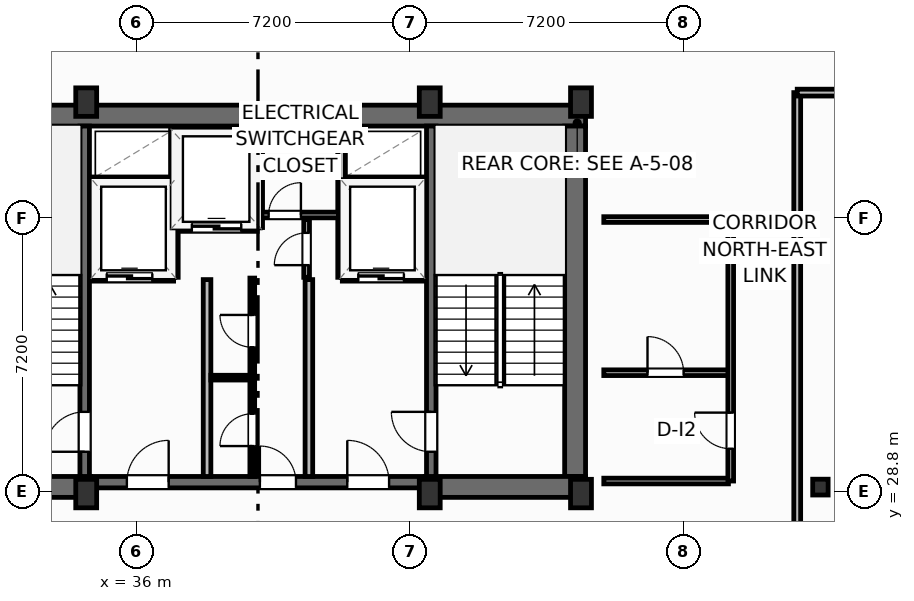
"""IFC4 building model, lengths in metres.
Left out: names, types, materials, properties, quantities, classifications, styles, units other than length and angle.
Written with IfcOpenShell. Run it as: python <this file> out.ifc"""

import sys

from ifc_helpers import new_model, si_unit, direction, frame, frame_2d, origin, origin_2d, place, context, subcontext, project, spatial, rectangle, i_section, extrude, element, fill, save


model = new_model("IFC4")
c1 = context("Model", 3, precision=1e-05, world=origin(), true_north=direction((0.0, 1.0)))
c2 = subcontext(c1, "Body", "Model", "MODEL_VIEW")
j1 = project(units=[si_unit("LENGTHUNIT", "METRE"), si_unit("PLANEANGLEUNIT", "RADIAN")], contexts=[c1])
p1 = place(None, origin())
s1 = spatial("IfcSite", under=j1, at=p1, CompositionType="ELEMENT")
p2 = place(p1, origin())
s2 = spatial("IfcBuilding", under=s1, at=p2, CompositionType="ELEMENT")
p3 = place(p2, frame((0.0, 0.0, 258.2)))
s3 = spatial("IfcBuildingStorey", under=s2, at=p3, CompositionType="ELEMENT", Elevation=258.2)
for number, where, z_axis, x_axis in (
    (1, (34.68, 28.75, 0.0), (0.0, 0.0, 1.0), (1.0, 0.0, 0.0)),
    (2, (43.72, 28.75, 0.0), (0.0, 0.0, 1.0), (1.0, 0.0, 0.0)),
    (3, (47.7, 28.75, 0.0), (0.0, 0.0, 1.0), (1.0, 0.0, 0.0)),
    (4, (34.68, 39.05, 0.0), (0.0, 0.0, 1.0), (1.0, 0.0, 0.0)),
    (5, (43.72, 39.05, 0.0), (0.0, 0.0, 1.0), (1.0, 0.0, 0.0)),
    (6, (47.7, 39.05, 0.0), (0.0, 0.0, 1.0), (1.0, 0.0, 0.0)),
):
    element("IfcColumn", number, at=place(p3, frame(where, z_axis=z_axis, x_axis=x_axis)), inside=s3, PredefinedType="COLUMN", context=c2, shape_type="SweptSolid", body=[
        extrude(rectangle(XDim=0.55, YDim=0.75, at=origin_2d()), origin(), (0.0, 0.0, 1.0), 3.7),
    ])
p4 = place(p3, frame((54.0, 28.92, 0.0), z_axis=(0.0, 0.0, 1.0), x_axis=(1.0, 0.0, 0.0)))
e7 = element("IfcColumn", 7, at=p4, inside=s3, PredefinedType="COLUMN", context=c2, shape_type="SweptSolid", body=[
    extrude(i_section(OverallWidth=0.406, OverallDepth=0.416, WebThickness=0.03, FlangeThickness=0.048, FilletRadius=0.025, at=origin_2d()), origin(), (0.0, 0.0, 1.0), 3.7),
])
p5 = place(p3, frame((30.58, 38.695, 0.0), z_axis=(0.0, 0.0, 1.0), x_axis=(1.0, 0.0, 0.0)))
e8 = element("IfcWall", 8, at=p5, inside=s3, PredefinedType="SHEAR", context=c2, shape_type="SweptSolid", body=[
    extrude(rectangle(XDim=17.24, YDim=0.55, at=frame_2d((8.62, 0.0))), origin(), (0.0, 0.0, 1.0), 3.45),
])
p6 = place(p3, frame((47.545, 29.2, 0.0), z_axis=(0.0, 0.0, 1.0), x_axis=(0.0, 1.0, 0.0)))
e9 = element("IfcWall", 9, at=p6, inside=s3, PredefinedType="SHEAR", context=c2, shape_type="SweptSolid", body=[
    extrude(rectangle(XDim=9.22, YDim=0.55, at=frame_2d((4.61, 0.0))), origin(), (0.0, 0.0, 1.0), 3.45),
])
for number, where, z_axis, x_axis in (
    (10, (30.58, 28.925, 0.0), (0.0, 0.0, 1.0), (1.0, 0.0, 0.0)),
    (11, (43.6, 28.925, 0.0), (0.0, 0.0, 1.0), (1.0, 0.0, 0.0)),
):
    element("IfcWall", number, at=place(p3, frame(where, z_axis=z_axis, x_axis=x_axis)), inside=s3, PredefinedType="SHEAR", context=c2, shape_type="SweptSolid", body=[
        extrude(rectangle(XDim=4.22, YDim=0.55, at=frame_2d((2.11, 0.0))), origin(), (0.0, 0.0, 1.0), 3.45),
    ])
p7 = place(p3, frame((34.8, 29.05, 0.0), z_axis=(0.0, 0.0, 1.0), x_axis=(1.0, 0.0, 0.0)))
e12 = element("IfcWall", 12, at=p7, inside=s3, PredefinedType="SHEAR", context=c2, shape_type="SweptSolid", body=[
    extrude(rectangle(XDim=8.8, YDim=0.3, at=frame_2d((4.4, 0.0))), origin(), (0.0, 0.0, 1.0), 3.45),
])
p8 = place(p7, frame((0.95, 0.0, 0.0)))
e13 = element("IfcOpeningElement", 13, at=p8, cuts=e12, PredefinedType="OPENING", context=c2, shape_type="SweptSolid", body=[
    extrude(rectangle(XDim=1.1, YDim=2.15, at=frame_2d((0.55, 1.075))), frame((0.0, 0.16, 0.0), z_axis=(0.0, -1.0, 0.0), x_axis=(1.0, 0.0, 0.0)), (0.0, 0.0, 1.0), 0.32),
])
p9 = place(p7, frame((6.75, 0.0, 0.0)))
e14 = element("IfcOpeningElement", 14, at=p9, cuts=e12, PredefinedType="OPENING", context=c2, shape_type="SweptSolid", body=[
    extrude(rectangle(XDim=1.1, YDim=2.15, at=frame_2d((0.55, 1.075))), frame((0.0, 0.16, 0.0), z_axis=(0.0, -1.0, 0.0), x_axis=(1.0, 0.0, 0.0)), (0.0, 0.0, 1.0), 0.32),
])
p10 = place(p7, frame((4.45, 0.0, 0.0)))
e15 = element("IfcOpeningElement", 15, at=p10, cuts=e12, PredefinedType="OPENING", context=c2, shape_type="SweptSolid", body=[
    extrude(rectangle(XDim=0.95, YDim=2.15, at=frame_2d((0.475, 1.075))), frame((0.0, 0.16, 0.0), z_axis=(0.0, -1.0, 0.0), x_axis=(1.0, 0.0, 0.0)), (0.0, 0.0, 1.0), 0.32),
])
p11 = place(p3, frame((34.64, 29.2, 0.0), z_axis=(0.0, 0.0, 1.0), x_axis=(0.0, 1.0, 0.0)))
e16 = element("IfcWall", 16, at=p11, inside=s3, PredefinedType="SHEAR", context=c2, shape_type="SweptSolid", body=[
    extrude(rectangle(XDim=9.22, YDim=0.25, at=frame_2d((4.61, 0.0))), origin(), (0.0, 0.0, 1.0), 3.45),
])
p12 = place(p11, frame((0.65, 0.0, 0.0)))
e17 = element("IfcOpeningElement", 17, at=p12, cuts=e16, PredefinedType="OPENING", context=c2, shape_type="SweptSolid", body=[
    extrude(rectangle(XDim=1.05, YDim=2.15, at=frame_2d((0.525, 1.075))), frame((0.0, 0.135, 0.0), z_axis=(0.0, -1.0, 0.0), x_axis=(1.0, 0.0, 0.0)), (0.0, 0.0, 1.0), 0.27),
])
p13 = place(p3, frame((43.76, 29.2, 0.0), z_axis=(0.0, 0.0, 1.0), x_axis=(0.0, 1.0, 0.0)))
e18 = element("IfcWall", 18, at=p13, inside=s3, PredefinedType="SHEAR", context=c2, shape_type="SweptSolid", body=[
    extrude(rectangle(XDim=9.22, YDim=0.25, at=frame_2d((4.61, 0.0))), origin(), (0.0, 0.0, 1.0), 3.45),
])
p14 = place(p13, frame((0.65, 0.0, 0.0)))
e19 = element("IfcOpeningElement", 19, at=p14, cuts=e18, PredefinedType="OPENING", context=c2, shape_type="SweptSolid", body=[
    extrude(rectangle(XDim=1.05, YDim=2.15, at=frame_2d((0.525, 1.075))), frame((0.0, 0.135, 0.0), z_axis=(0.0, -1.0, 0.0), x_axis=(1.0, 0.0, 0.0)), (0.0, 0.0, 1.0), 0.27),
])
p15 = place(p3, frame((53.39, 19.24, 0.0), z_axis=(0.0, 0.0, 1.0), x_axis=(0.0, 1.0, 0.0)))
e20 = element("IfcWall", 20, at=p15, inside=s3, PredefinedType="PARTITIONING", context=c2, shape_type="SweptSolid", body=[
    extrude(rectangle(XDim=20.06, YDim=0.18, at=frame_2d((10.03, 0.0))), origin(), (0.0, 0.0, 1.0), 3.45),
])
p16 = place(p15, frame((7.7, 0.0, 0.0)))
e21 = element("IfcOpeningElement", 21, at=p16, cuts=e20, PredefinedType="OPENING", context=c2, shape_type="SweptSolid", body=[
    extrude(rectangle(XDim=0.95, YDim=2.05, at=frame_2d((0.475, 1.025))), frame((0.0, 0.1, 0.0), z_axis=(0.0, -1.0, 0.0), x_axis=(1.0, 0.0, 0.0)), (0.0, 0.0, 1.0), 0.2),
])
p17 = place(p3, frame((53.39, 39.3, 0.0), z_axis=(0.0, 0.0, 1.0), x_axis=(1.0, 0.0, 0.0)))
e22 = element("IfcWall", 22, at=p17, inside=s3, PredefinedType="PARTITIONING", context=c2, shape_type="SweptSolid", body=[
    extrude(rectangle(XDim=16.149, YDim=0.18, at=frame_2d((8.075, 0.0))), origin(), (0.0, 0.0, 1.0), 2.739),
])
for number, where, z_axis, x_axis in (
    (23, (37.86, 29.2, 0.0), (0.0, 0.0, 1.0), (0.0, 1.0, 0.0)),
    (24, (40.54, 29.2, 0.0), (0.0, 0.0, 1.0), (0.0, 1.0, 0.0)),
):
    element("IfcWall", number, at=place(p3, frame(where, z_axis=z_axis, x_axis=x_axis)), inside=s3, PredefinedType="PARTITIONING", context=c2, shape_type="SweptSolid", body=[
        extrude(rectangle(XDim=5.18, YDim=0.2, at=frame_2d((2.59, 0.0))), origin(), (0.0, 0.0, 1.0), 3.45),
    ])
p18 = place(p3, frame((34.8, 34.44, 0.0), z_axis=(0.0, 0.0, 1.0), x_axis=(1.0, 0.0, 0.0)))
e25 = element("IfcWall", 25, at=p18, inside=s3, PredefinedType="PARTITIONING", context=c2, shape_type="SweptSolid", body=[
    extrude(rectangle(XDim=2.18, YDim=0.2, at=frame_2d((1.09, 0.0))), origin(), (0.0, 0.0, 1.0), 3.45),
])
p19 = place(p18, frame((0.42, 0.0, 0.0)))
e26 = element("IfcOpeningElement", 26, at=p19, cuts=e25, PredefinedType="OPENING", context=c2, shape_type="SweptSolid", body=[
    extrude(rectangle(XDim=1.2, YDim=2.2, at=frame_2d((0.6, 1.1))), frame((0.0, 0.11, 0.0), z_axis=(0.0, -1.0, 0.0), x_axis=(1.0, 0.0, 0.0)), (0.0, 0.0, 1.0), 0.22),
])
p20 = place(p3, frame((34.8, 36.98, 0.0), z_axis=(0.0, 0.0, 1.0), x_axis=(1.0, 0.0, 0.0)))
e27 = element("IfcWall", 27, at=p20, inside=s3, PredefinedType="PARTITIONING", context=c2, shape_type="SweptSolid", body=[
    extrude(rectangle(XDim=2.18, YDim=0.2, at=frame_2d((1.09, 0.0))), origin(), (0.0, 0.0, 1.0), 3.45),
])
p21 = place(p3, frame((37.0, 34.44, 0.0), z_axis=(0.0, 0.0, 1.0), x_axis=(0.0, 1.0, 0.0)))
e28 = element("IfcWall", 28, at=p21, inside=s3, PredefinedType="PARTITIONING", context=c2, shape_type="SweptSolid", body=[
    extrude(rectangle(XDim=3.9, YDim=0.2, at=frame_2d((1.95, 0.0))), origin(), (0.0, 0.0, 1.0), 3.45),
])
p22 = place(p3, frame((41.42, 34.44, 0.0), z_axis=(0.0, 0.0, 1.0), x_axis=(1.0, 0.0, 0.0)))
e29 = element("IfcWall", 29, at=p22, inside=s3, PredefinedType="PARTITIONING", context=c2, shape_type="SweptSolid", body=[
    extrude(rectangle(XDim=2.18, YDim=0.2, at=frame_2d((1.09, 0.0))), origin(), (0.0, 0.0, 1.0), 3.45),
])
p23 = place(p22, frame((0.42, 0.0, 0.0)))
e30 = element("IfcOpeningElement", 30, at=p23, cuts=e29, PredefinedType="OPENING", context=c2, shape_type="SweptSolid", body=[
    extrude(rectangle(XDim=1.2, YDim=2.2, at=frame_2d((0.6, 1.1))), frame((0.0, 0.11, 0.0), z_axis=(0.0, -1.0, 0.0), x_axis=(1.0, 0.0, 0.0)), (0.0, 0.0, 1.0), 0.22),
])
p24 = place(p3, frame((41.42, 36.98, 0.0), z_axis=(0.0, 0.0, 1.0), x_axis=(1.0, 0.0, 0.0)))
e31 = element("IfcWall", 31, at=p24, inside=s3, PredefinedType="PARTITIONING", context=c2, shape_type="SweptSolid", body=[
    extrude(rectangle(XDim=2.18, YDim=0.2, at=frame_2d((1.09, 0.0))), origin(), (0.0, 0.0, 1.0), 3.45),
])
p25 = place(p3, frame((41.4, 34.44, 0.0), z_axis=(0.0, 0.0, 1.0), x_axis=(0.0, 1.0, 0.0)))
e32 = element("IfcWall", 32, at=p25, inside=s3, PredefinedType="PARTITIONING", context=c2, shape_type="SweptSolid", body=[
    extrude(rectangle(XDim=3.9, YDim=0.2, at=frame_2d((1.95, 0.0))), origin(), (0.0, 0.0, 1.0), 3.45),
])
p26 = place(p3, frame((37.06, 35.75, 0.0), z_axis=(0.0, 0.0, 1.0), x_axis=(1.0, 0.0, 0.0)))
e33 = element("IfcWall", 33, at=p26, inside=s3, PredefinedType="PARTITIONING", context=c2, shape_type="SweptSolid", body=[
    extrude(rectangle(XDim=2.12, YDim=0.2, at=frame_2d((1.06, 0.0))), origin(), (0.0, 0.0, 1.0), 3.45),
])
p27 = place(p26, frame((0.4, 0.0, 0.0)))
e34 = element("IfcOpeningElement", 34, at=p27, cuts=e33, PredefinedType="OPENING", context=c2, shape_type="SweptSolid", body=[
    extrude(rectangle(XDim=1.3, YDim=2.2, at=frame_2d((0.65, 1.1))), frame((0.0, 0.11, 0.0), z_axis=(0.0, -1.0, 0.0), x_axis=(1.0, 0.0, 0.0)), (0.0, 0.0, 1.0), 0.22),
])
p28 = place(p3, frame((39.22, 35.75, 0.0), z_axis=(0.0, 0.0, 1.0), x_axis=(0.0, 1.0, 0.0)))
e35 = element("IfcWall", 35, at=p28, inside=s3, PredefinedType="PARTITIONING", context=c2, shape_type="SweptSolid", body=[
    extrude(rectangle(XDim=2.59, YDim=0.2, at=frame_2d((1.295, 0.0))), origin(), (0.0, 0.0, 1.0), 3.45),
])
p29 = place(p3, frame((39.3, 36.08, 0.0), z_axis=(0.0, 0.0, 1.0), x_axis=(1.0, 0.0, 0.0)))
e36 = element("IfcWall", 36, at=p29, inside=s3, PredefinedType="PARTITIONING", context=c2, shape_type="SweptSolid", body=[
    extrude(rectangle(XDim=2.02, YDim=0.15, at=frame_2d((1.01, 0.0))), origin(), (0.0, 0.0, 1.0), 3.45),
])
p30 = place(p29, frame((0.18, 0.0, 0.0)))
e37 = element("IfcOpeningElement", 37, at=p30, cuts=e36, PredefinedType="OPENING", context=c2, shape_type="SweptSolid", body=[
    extrude(rectangle(XDim=0.85, YDim=2.05, at=frame_2d((0.425, 1.025))), frame((0.0, 0.085, 0.0), z_axis=(0.0, -1.0, 0.0), x_axis=(1.0, 0.0, 0.0)), (0.0, 0.0, 1.0), 0.17),
])
p31 = place(p3, frame((40.48, 34.44, 0.0), z_axis=(0.0, 0.0, 1.0), x_axis=(0.0, 1.0, 0.0)))
e38 = element("IfcWall", 38, at=p31, inside=s3, PredefinedType="PARTITIONING", context=c2, shape_type="SweptSolid", body=[
    extrude(rectangle(XDim=1.52, YDim=0.15, at=frame_2d((0.76, 0.0))), origin(), (0.0, 0.0, 1.0), 3.45),
])
p32 = place(p31, frame((0.32, 0.0, 0.0)))
e39 = element("IfcOpeningElement", 39, at=p32, cuts=e38, PredefinedType="OPENING", context=c2, shape_type="SweptSolid", body=[
    extrude(rectangle(XDim=0.85, YDim=2.05, at=frame_2d((0.425, 1.025))), frame((0.0, 0.085, 0.0), z_axis=(0.0, -1.0, 0.0), x_axis=(1.0, 0.0, 0.0)), (0.0, 0.0, 1.0), 0.17),
])
p33 = place(p3, frame((37.96, 31.8, 0.0), z_axis=(0.0, 0.0, 1.0), x_axis=(1.0, 0.0, 0.0)))
e40 = element("IfcWall", 40, at=p33, inside=s3, PredefinedType="PARTITIONING", context=c2, shape_type="SweptSolid", body=[
    extrude(rectangle(XDim=1.09, YDim=0.125, at=frame_2d((0.545, 0.0))), origin(), (0.0, 0.0, 1.0), 3.45),
])
p34 = place(p3, frame((39.05, 29.2, 0.0), z_axis=(0.0, 0.0, 1.0), x_axis=(0.0, 1.0, 0.0)))
e41 = element("IfcWall", 41, at=p34, inside=s3, PredefinedType="PARTITIONING", context=c2, shape_type="SweptSolid", body=[
    extrude(rectangle(XDim=5.22, YDim=0.125, at=frame_2d((2.61, 0.0))), origin(), (0.0, 0.0, 1.0), 3.45),
])
p35 = place(p34, frame((0.8, 0.0, 0.0)))
e42 = element("IfcOpeningElement", 42, at=p35, cuts=e41, PredefinedType="OPENING", context=c2, shape_type="SweptSolid", body=[
    extrude(rectangle(XDim=0.85, YDim=2.05, at=frame_2d((0.425, 1.025))), frame((0.0, 0.073, 0.0), z_axis=(0.0, -1.0, 0.0), x_axis=(1.0, 0.0, 0.0)), (0.0, 0.0, 1.0), 0.145),
])
p36 = place(p34, frame((3.4, 0.0, 0.0)))
e43 = element("IfcOpeningElement", 43, at=p36, cuts=e41, PredefinedType="OPENING", context=c2, shape_type="SweptSolid", body=[
    extrude(rectangle(XDim=0.85, YDim=2.05, at=frame_2d((0.425, 1.025))), frame((0.0, 0.073, 0.0), z_axis=(0.0, -1.0, 0.0), x_axis=(1.0, 0.0, 0.0)), (0.0, 0.0, 1.0), 0.145),
])
p37 = place(p3, frame((48.3, 31.93, 0.0), z_axis=(0.0, 0.0, 1.0), x_axis=(1.0, 0.0, 0.0)))
e44 = element("IfcWall", 44, at=p37, inside=s3, PredefinedType="PARTITIONING", context=c2, shape_type="SweptSolid", body=[
    extrude(rectangle(XDim=3.28, YDim=0.15, at=frame_2d((1.64, 0.0))), origin(), (0.0, 0.0, 1.0), 3.45),
])
p38 = place(p37, frame((1.15, 0.0, 0.0)))
e45 = element("IfcOpeningElement", 45, at=p38, cuts=e44, PredefinedType="OPENING", context=c2, shape_type="SweptSolid", body=[
    extrude(rectangle(XDim=0.95, YDim=2.05, at=frame_2d((0.475, 1.025))), frame((0.0, 0.085, 0.0), z_axis=(0.0, -1.0, 0.0), x_axis=(1.0, 0.0, 0.0)), (0.0, 0.0, 1.0), 0.17),
])
p39 = place(p3, frame((48.3, 29.08, 0.0), z_axis=(0.0, 0.0, 1.0), x_axis=(1.0, 0.0, 0.0)))
e46 = element("IfcWall", 46, at=p39, inside=s3, PredefinedType="PARTITIONING", context=c2, shape_type="SweptSolid", body=[
    extrude(rectangle(XDim=3.28, YDim=0.15, at=frame_2d((1.64, 0.0))), origin(), (0.0, 0.0, 1.0), 2.662),
])
p40 = place(p3, frame((48.3, 35.96, 0.0), z_axis=(0.0, 0.0, 1.0), x_axis=(1.0, 0.0, 0.0)))
e47 = element("IfcWall", 47, at=p40, inside=s3, PredefinedType="PARTITIONING", context=c2, shape_type="SweptSolid", body=[
    extrude(rectangle(XDim=3.28, YDim=0.15, at=frame_2d((1.64, 0.0))), origin(), (0.0, 0.0, 1.0), 3.45),
])
p41 = place(p3, frame((51.64, 29.08, 0.0), z_axis=(0.0, 0.0, 1.0), x_axis=(0.0, 1.0, 0.0)))
e48 = element("IfcWall", 48, at=p41, inside=s3, PredefinedType="PARTITIONING", context=c2, shape_type="SweptSolid", body=[
    extrude(rectangle(XDim=6.88, YDim=0.15, at=frame_2d((3.44, 0.0))), origin(), (0.0, 0.0, 1.0), 3.45),
])
p42 = place(p41, frame((0.85, 0.0, 0.0)))
e49 = element("IfcOpeningElement", 49, at=p42, cuts=e48, PredefinedType="OPENING", context=c2, shape_type="SweptSolid", body=[
    extrude(rectangle(XDim=0.95, YDim=2.05, at=frame_2d((0.475, 1.025))), frame((0.0, 0.085, 0.0), z_axis=(0.0, -1.0, 0.0), x_axis=(1.0, 0.0, 0.0)), (0.0, 0.0, 1.0), 0.17),
])
p43 = place(p12, origin())
e50 = element("IfcDoor", 50, at=p43, inside=s3, OperationType="SINGLE_SWING_LEFT", PredefinedType="DOOR", context=c2, shape_type="SweptSolid", body=[
    extrude(rectangle(XDim=1.05, YDim=2.15, at=frame_2d((0.525, 1.075))), frame((0.0, 0.025, 0.0), z_axis=(0.0, -1.0, 0.0), x_axis=(1.0, 0.0, 0.0)), (0.0, 0.0, 1.0), 0.05),
])
fill(e17, e50)
p44 = place(p14, origin())
e51 = element("IfcDoor", 51, at=p44, inside=s3, OperationType="SINGLE_SWING_RIGHT", PredefinedType="DOOR", context=c2, shape_type="SweptSolid", body=[
    extrude(rectangle(XDim=1.05, YDim=2.15, at=frame_2d((0.525, 1.075))), frame((0.0, 0.025, 0.0), z_axis=(0.0, -1.0, 0.0), x_axis=(1.0, 0.0, 0.0)), (0.0, 0.0, 1.0), 0.05),
])
fill(e19, e51)
p45 = place(p8, origin())
e52 = element("IfcDoor", 52, at=p45, inside=s3, OperationType="SINGLE_SWING_RIGHT", PredefinedType="DOOR", context=c2, shape_type="SweptSolid", body=[
    extrude(rectangle(XDim=1.1, YDim=2.15, at=frame_2d((0.55, 1.075))), frame((0.0, 0.025, 0.0), z_axis=(0.0, -1.0, 0.0), x_axis=(1.0, 0.0, 0.0)), (0.0, 0.0, 1.0), 0.05),
])
fill(e13, e52)
p46 = place(p9, origin())
e53 = element("IfcDoor", 53, at=p46, inside=s3, OperationType="SINGLE_SWING_LEFT", PredefinedType="DOOR", context=c2, shape_type="SweptSolid", body=[
    extrude(rectangle(XDim=1.1, YDim=2.15, at=frame_2d((0.55, 1.075))), frame((0.0, 0.025, 0.0), z_axis=(0.0, -1.0, 0.0), x_axis=(1.0, 0.0, 0.0)), (0.0, 0.0, 1.0), 0.05),
])
fill(e14, e53)
p47 = place(p19, origin())
e54 = element("IfcDoor", 54, at=p47, inside=s3, OperationType="SLIDING_TO_LEFT", PredefinedType="DOOR", context=c2, shape_type="SweptSolid", body=[
    extrude(rectangle(XDim=1.2, YDim=2.2, at=frame_2d((0.6, 1.1))), frame((0.0, 0.025, 0.0), z_axis=(0.0, -1.0, 0.0), x_axis=(1.0, 0.0, 0.0)), (0.0, 0.0, 1.0), 0.05),
])
fill(e26, e54)
p48 = place(p23, origin())
e55 = element("IfcDoor", 55, at=p48, inside=s3, OperationType="SLIDING_TO_LEFT", PredefinedType="DOOR", context=c2, shape_type="SweptSolid", body=[
    extrude(rectangle(XDim=1.2, YDim=2.2, at=frame_2d((0.6, 1.1))), frame((0.0, 0.025, 0.0), z_axis=(0.0, -1.0, 0.0), x_axis=(1.0, 0.0, 0.0)), (0.0, 0.0, 1.0), 0.05),
])
fill(e30, e55)
p49 = place(p27, origin())
e56 = element("IfcDoor", 56, at=p49, inside=s3, OperationType="SLIDING_TO_LEFT", PredefinedType="DOOR", context=c2, shape_type="SweptSolid", body=[
    extrude(rectangle(XDim=1.3, YDim=2.2, at=frame_2d((0.65, 1.1))), frame((0.0, 0.025, 0.0), z_axis=(0.0, -1.0, 0.0), x_axis=(1.0, 0.0, 0.0)), (0.0, 0.0, 1.0), 0.05),
])
fill(e34, e56)
p50 = place(p30, origin())
e57 = element("IfcDoor", 57, at=p50, inside=s3, OperationType="SINGLE_SWING_RIGHT", PredefinedType="DOOR", context=c2, shape_type="SweptSolid", body=[
    extrude(rectangle(XDim=0.85, YDim=2.05, at=frame_2d((0.425, 1.025))), frame((0.0, 0.025, 0.0), z_axis=(0.0, -1.0, 0.0), x_axis=(1.0, 0.0, 0.0)), (0.0, 0.0, 1.0), 0.05),
])
fill(e37, e57)
p51 = place(p32, origin())
e58 = element("IfcDoor", 58, at=p51, inside=s3, OperationType="SINGLE_SWING_LEFT", PredefinedType="DOOR", context=c2, shape_type="SweptSolid", body=[
    extrude(rectangle(XDim=0.85, YDim=2.05, at=frame_2d((0.425, 1.025))), frame((0.0, 0.025, 0.0), z_axis=(0.0, -1.0, 0.0), x_axis=(1.0, 0.0, 0.0)), (0.0, 0.0, 1.0), 0.05),
])
fill(e39, e58)
p52 = place(p35, origin())
e59 = element("IfcDoor", 59, at=p52, inside=s3, OperationType="SINGLE_SWING_LEFT", PredefinedType="DOOR", context=c2, shape_type="SweptSolid", body=[
    extrude(rectangle(XDim=0.85, YDim=2.05, at=frame_2d((0.425, 1.025))), frame((0.0, 0.025, 0.0), z_axis=(0.0, -1.0, 0.0), x_axis=(1.0, 0.0, 0.0)), (0.0, 0.0, 1.0), 0.05),
])
fill(e42, e59)
p53 = place(p36, origin())
e60 = element("IfcDoor", 60, at=p53, inside=s3, OperationType="SINGLE_SWING_RIGHT", PredefinedType="DOOR", context=c2, shape_type="SweptSolid", body=[
    extrude(rectangle(XDim=0.85, YDim=2.05, at=frame_2d((0.425, 1.025))), frame((0.0, 0.025, 0.0), z_axis=(0.0, -1.0, 0.0), x_axis=(1.0, 0.0, 0.0)), (0.0, 0.0, 1.0), 0.05),
])
fill(e43, e60)
p54 = place(p10, origin())
e61 = element("IfcDoor", 61, at=p54, inside=s3, OperationType="SINGLE_SWING_LEFT", PredefinedType="DOOR", context=c2, shape_type="SweptSolid", body=[
    extrude(rectangle(XDim=0.95, YDim=2.15, at=frame_2d((0.475, 1.075))), frame((0.0, 0.025, 0.0), z_axis=(0.0, -1.0, 0.0), x_axis=(1.0, 0.0, 0.0)), (0.0, 0.0, 1.0), 0.05),
])
fill(e15, e61)
p55 = place(p38, origin())
e62 = element("IfcDoor", 62, at=p55, inside=s3, OperationType="SINGLE_SWING_LEFT", PredefinedType="DOOR", context=c2, shape_type="SweptSolid", body=[
    extrude(rectangle(XDim=0.95, YDim=2.05, at=frame_2d((0.475, 1.025))), frame((0.0, 0.025, 0.0), z_axis=(0.0, -1.0, 0.0), x_axis=(1.0, 0.0, 0.0)), (0.0, 0.0, 1.0), 0.05),
])
fill(e45, e62)
p56 = place(p42, origin())
e63 = element("IfcDoor", 63, at=p56, inside=s3, OperationType="SINGLE_SWING_RIGHT", PredefinedType="DOOR", context=c2, shape_type="SweptSolid", body=[
    extrude(rectangle(XDim=0.95, YDim=2.05, at=frame_2d((0.475, 1.025))), frame((0.0, 0.025, 0.0), z_axis=(0.0, -1.0, 0.0), x_axis=(1.0, 0.0, 0.0)), (0.0, 0.0, 1.0), 0.05),
])
fill(e49, e63)
save(model, sys.argv[1])
